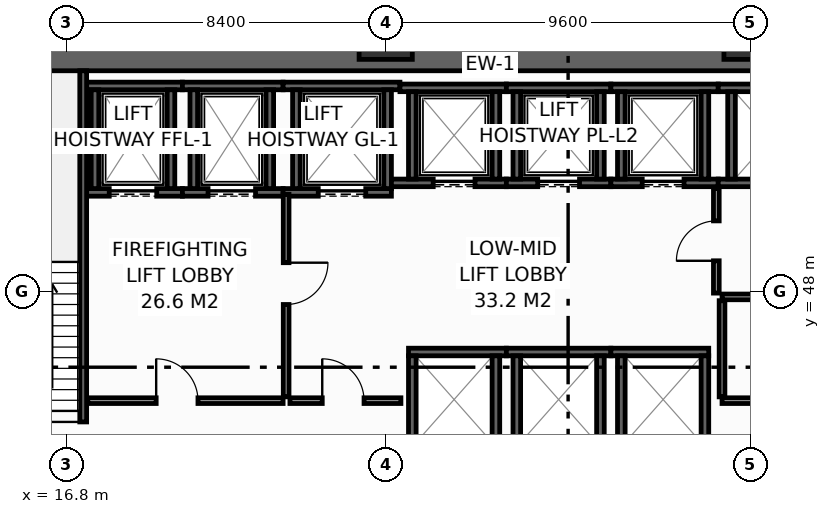
"""IFC4 building model, lengths in metres.
Left out: names, types, materials, properties, quantities, classifications, styles, units other than length and angle.
Written with IfcOpenShell. Run it as: python <this file> out.ifc"""

import sys

from ifc_helpers import new_model, si_unit, direction, frame, frame_2d, origin, origin_2d, place, context, subcontext, project, spatial, rectangle, hollow_rectangle, extrude, element, fill, save


model = new_model("IFC4")
c1 = context("Model", 3, precision=1e-05, world=origin(), true_north=direction((0.0, 1.0)))
c2 = subcontext(c1, "Body", "Model", "MODEL_VIEW")
j1 = project(units=[si_unit("LENGTHUNIT", "METRE"), si_unit("PLANEANGLEUNIT", "RADIAN")], contexts=[c1])
p1 = place(None, origin())
s1 = spatial("IfcSite", under=j1, at=p1, CompositionType="ELEMENT")
p2 = place(p1, origin())
s2 = spatial("IfcBuilding", under=s1, at=p2, CompositionType="ELEMENT")
p3 = place(p2, frame((0.0, 0.0, 11.4)))
s3 = spatial("IfcBuildingStorey", under=s2, at=p3, CompositionType="ELEMENT", Elevation=11.4)
p4 = place(p3, frame((13.5, 54.1, 0.0), z_axis=(0.0, 0.0, 1.0), x_axis=(1.0, 0.0, 0.0)))
e1 = element("IfcWall", 1, at=p4, inside=s3, PredefinedType="SHEAR", context=c2, shape_type="SweptSolid", body=[
    extrude(rectangle(XDim=32.9, YDim=0.6, at=frame_2d((16.45, 0.0))), origin(), (0.0, 0.0, 1.0), 5.1),
])
for number, where, z_axis, x_axis in (
    (2, (25.2, 54.8, 0.0), (0.0, 0.0, 1.0), (1.0, 0.0, 0.0)),
    (3, (34.8, 54.8, 0.0), (0.0, 0.0, 1.0), (1.0, 0.0, 0.0)),
):
    element("IfcColumn", number, at=place(p3, frame(where, z_axis=z_axis, x_axis=x_axis)), inside=s3, PredefinedType="COLUMN", context=c2, shape_type="SweptSolid", body=[
        extrude(hollow_rectangle(XDim=1.4, YDim=1.4, WallThickness=0.065, at=origin_2d()), origin(), (0.0, 0.0, 1.0), 5.4),
    ])
p5 = place(p3, frame((17.33, 50.6, 0.0), z_axis=(0.0, 0.0, 1.0), x_axis=(1.0, 0.0, 0.0)))
e4 = element("IfcWall", 4, at=p5, inside=s3, PredefinedType="SHEAR", context=c2, shape_type="SweptSolid", body=[
    extrude(rectangle(XDim=2.52, YDim=0.2, at=frame_2d((1.26, 0.0))), origin(), (0.0, 0.0, 1.0), 5.1),
])
p6 = place(p5, frame((0.595, 0.0, 0.0)))
e5 = element("IfcOpeningElement", 5, at=p6, cuts=e4, PredefinedType="OPENING", context=c2, shape_type="SweptSolid", body=[
    extrude(rectangle(XDim=1.25, YDim=2.3, at=frame_2d((0.625, 1.15))), frame((0.0, 0.11, 0.0), z_axis=(0.0, -1.0, 0.0), x_axis=(1.0, 0.0, 0.0)), (0.0, 0.0, 1.0), 0.22),
])
p7 = place(p3, frame((17.33, 53.4, 0.0), z_axis=(0.0, 0.0, 1.0), x_axis=(1.0, 0.0, 0.0)))
e6 = element("IfcWall", 6, at=p7, inside=s3, PredefinedType="SHEAR", context=c2, shape_type="SweptSolid", body=[
    extrude(rectangle(XDim=2.52, YDim=0.2, at=frame_2d((1.26, 0.0))), origin(), (0.0, 0.0, 1.0), 5.1),
])
for number, where, z_axis, x_axis in (
    (7, (17.55, 50.7, 0.0), (0.0, 0.0, 1.0), (0.0, 1.0, 0.0)),
    (8, (19.55, 50.7, 0.0), (0.0, 0.0, 1.0), (0.0, 1.0, 0.0)),
):
    element("IfcWall", number, at=place(p3, frame(where, z_axis=z_axis, x_axis=x_axis)), inside=s3, PredefinedType="SHEAR", context=c2, shape_type="SweptSolid", body=[
        extrude(rectangle(XDim=2.6, YDim=0.2, at=frame_2d((1.3, 0.0))), origin(), (0.0, 0.0, 1.0), 5.1),
    ])
p8 = place(p3, frame((19.85, 50.6, 0.0), z_axis=(0.0, 0.0, 1.0), x_axis=(1.0, 0.0, 0.0)))
e9 = element("IfcWall", 9, at=p8, inside=s3, PredefinedType="SHEAR", context=c2, shape_type="SweptSolid", body=[
    extrude(rectangle(XDim=2.65, YDim=0.2, at=frame_2d((1.325, 0.0))), origin(), (0.0, 0.0, 1.0), 5.1),
])
p9 = place(p8, frame((0.675, 0.0, 0.0)))
e10 = element("IfcOpeningElement", 10, at=p9, cuts=e9, PredefinedType="OPENING", context=c2, shape_type="SweptSolid", body=[
    extrude(rectangle(XDim=1.25, YDim=2.3, at=frame_2d((0.625, 1.15))), frame((0.0, 0.11, 0.0), z_axis=(0.0, -1.0, 0.0), x_axis=(1.0, 0.0, 0.0)), (0.0, 0.0, 1.0), 0.22),
])
p10 = place(p3, frame((19.85, 53.4, 0.0), z_axis=(0.0, 0.0, 1.0), x_axis=(1.0, 0.0, 0.0)))
e11 = element("IfcWall", 11, at=p10, inside=s3, PredefinedType="SHEAR", context=c2, shape_type="SweptSolid", body=[
    extrude(rectangle(XDim=2.65, YDim=0.2, at=frame_2d((1.325, 0.0))), origin(), (0.0, 0.0, 1.0), 5.1),
])
for number, where, z_axis, x_axis in (
    (12, (20.15, 50.7, 0.0), (0.0, 0.0, 1.0), (0.0, 1.0, 0.0)),
    (13, (22.15, 50.7, 0.0), (0.0, 0.0, 1.0), (0.0, 1.0, 0.0)),
):
    element("IfcWall", number, at=place(p3, frame(where, z_axis=z_axis, x_axis=x_axis)), inside=s3, PredefinedType="SHEAR", context=c2, shape_type="SweptSolid", body=[
        extrude(rectangle(XDim=2.6, YDim=0.2, at=frame_2d((1.3, 0.0))), origin(), (0.0, 0.0, 1.0), 5.1),
    ])
p11 = place(p3, frame((22.5, 50.6, 0.0), z_axis=(0.0, 0.0, 1.0), x_axis=(1.0, 0.0, 0.0)))
e14 = element("IfcWall", 14, at=p11, inside=s3, PredefinedType="SHEAR", context=c2, shape_type="SweptSolid", body=[
    extrude(rectangle(XDim=2.85, YDim=0.2, at=frame_2d((1.425, 0.0))), origin(), (0.0, 0.0, 1.0), 5.1),
])
p12 = place(p11, frame((0.925, 0.0, 0.0)))
e15 = element("IfcOpeningElement", 15, at=p12, cuts=e14, PredefinedType="OPENING", context=c2, shape_type="SweptSolid", body=[
    extrude(rectangle(XDim=1.25, YDim=2.3, at=frame_2d((0.625, 1.15))), frame((0.0, 0.11, 0.0), z_axis=(0.0, -1.0, 0.0), x_axis=(1.0, 0.0, 0.0)), (0.0, 0.0, 1.0), 0.22),
])
p13 = place(p3, frame((22.5, 53.4, 0.0), z_axis=(0.0, 0.0, 1.0), x_axis=(1.0, 0.0, 0.0)))
e16 = element("IfcWall", 16, at=p13, inside=s3, PredefinedType="SHEAR", context=c2, shape_type="SweptSolid", body=[
    extrude(rectangle(XDim=3.075, YDim=0.2, at=frame_2d((1.538, 0.0))), origin(), (0.0, 0.0, 1.0), 5.1),
])
for number, where, z_axis, x_axis in (
    (17, (22.85, 50.7, 0.0), (0.0, 0.0, 1.0), (0.0, 1.0, 0.0)),
    (18, (25.25, 50.7, 0.0), (0.0, 0.0, 1.0), (0.0, 1.0, 0.0)),
):
    element("IfcWall", number, at=place(p3, frame(where, z_axis=z_axis, x_axis=x_axis)), inside=s3, PredefinedType="SHEAR", context=c2, shape_type="SweptSolid", body=[
        extrude(rectangle(XDim=2.6, YDim=0.2, at=frame_2d((1.3, 0.0))), origin(), (0.0, 0.0, 1.0), 5.1),
    ])
p14 = place(p3, frame((25.35, 50.85, 0.0), z_axis=(0.0, 0.0, 1.0), x_axis=(1.0, 0.0, 0.0)))
e19 = element("IfcWall", 19, at=p14, inside=s3, PredefinedType="SHEAR", context=c2, shape_type="SweptSolid", body=[
    extrude(rectangle(XDim=3.025, YDim=0.2, at=frame_2d((1.512, 0.0))), origin(), (0.0, 0.0, 1.0), 5.1),
])
p15 = place(p14, frame((1.1, 0.0, 0.0)))
e20 = element("IfcOpeningElement", 20, at=p15, cuts=e19, PredefinedType="OPENING", context=c2, shape_type="SweptSolid", body=[
    extrude(rectangle(XDim=1.1, YDim=2.2, at=frame_2d((0.55, 1.1))), frame((0.0, 0.11, 0.0), z_axis=(0.0, -1.0, 0.0), x_axis=(1.0, 0.0, 0.0)), (0.0, 0.0, 1.0), 0.22),
])
p16 = place(p3, frame((25.575, 53.35, 0.0), z_axis=(0.0, 0.0, 1.0), x_axis=(1.0, 0.0, 0.0)))
e21 = element("IfcWall", 21, at=p16, inside=s3, PredefinedType="SHEAR", context=c2, shape_type="SweptSolid", body=[
    extrude(rectangle(XDim=2.8, YDim=0.2, at=frame_2d((1.4, 0.0))), origin(), (0.0, 0.0, 1.0), 5.1),
])
for number, where, z_axis, x_axis in (
    (22, (25.9, 50.95, 0.0), (0.0, 0.0, 1.0), (0.0, 1.0, 0.0)),
    (23, (28.1, 50.95, 0.0), (0.0, 0.0, 1.0), (0.0, 1.0, 0.0)),
):
    element("IfcWall", number, at=place(p3, frame(where, z_axis=z_axis, x_axis=x_axis)), inside=s3, PredefinedType="SHEAR", context=c2, shape_type="SweptSolid", body=[
        extrude(rectangle(XDim=2.3, YDim=0.2, at=frame_2d((1.15, 0.0))), origin(), (0.0, 0.0, 1.0), 5.1),
    ])
p17 = place(p3, frame((28.375, 50.85, 0.0), z_axis=(0.0, 0.0, 1.0), x_axis=(1.0, 0.0, 0.0)))
e24 = element("IfcWall", 24, at=p17, inside=s3, PredefinedType="SHEAR", context=c2, shape_type="SweptSolid", body=[
    extrude(rectangle(XDim=2.75, YDim=0.2, at=frame_2d((1.375, 0.0))), origin(), (0.0, 0.0, 1.0), 5.1),
])
p18 = place(p17, frame((0.825, 0.0, 0.0)))
e25 = element("IfcOpeningElement", 25, at=p18, cuts=e24, PredefinedType="OPENING", context=c2, shape_type="SweptSolid", body=[
    extrude(rectangle(XDim=1.1, YDim=2.2, at=frame_2d((0.55, 1.1))), frame((0.0, 0.11, 0.0), z_axis=(0.0, -1.0, 0.0), x_axis=(1.0, 0.0, 0.0)), (0.0, 0.0, 1.0), 0.22),
])
p19 = place(p3, frame((28.375, 53.35, 0.0), z_axis=(0.0, 0.0, 1.0), x_axis=(1.0, 0.0, 0.0)))
e26 = element("IfcWall", 26, at=p19, inside=s3, PredefinedType="SHEAR", context=c2, shape_type="SweptSolid", body=[
    extrude(rectangle(XDim=2.75, YDim=0.2, at=frame_2d((1.375, 0.0))), origin(), (0.0, 0.0, 1.0), 5.1),
])
for number, where, z_axis, x_axis in (
    (27, (28.65, 50.95, 0.0), (0.0, 0.0, 1.0), (0.0, 1.0, 0.0)),
    (28, (30.85, 50.95, 0.0), (0.0, 0.0, 1.0), (0.0, 1.0, 0.0)),
):
    element("IfcWall", number, at=place(p3, frame(where, z_axis=z_axis, x_axis=x_axis)), inside=s3, PredefinedType="SHEAR", context=c2, shape_type="SweptSolid", body=[
        extrude(rectangle(XDim=2.3, YDim=0.2, at=frame_2d((1.15, 0.0))), origin(), (0.0, 0.0, 1.0), 5.1),
    ])
p20 = place(p3, frame((31.125, 50.85, 0.0), z_axis=(0.0, 0.0, 1.0), x_axis=(1.0, 0.0, 0.0)))
e29 = element("IfcWall", 29, at=p20, inside=s3, PredefinedType="SHEAR", context=c2, shape_type="SweptSolid", body=[
    extrude(rectangle(XDim=2.825, YDim=0.2, at=frame_2d((1.413, 0.0))), origin(), (0.0, 0.0, 1.0), 5.1),
])
p21 = place(p20, frame((0.825, 0.0, 0.0)))
e30 = element("IfcOpeningElement", 30, at=p21, cuts=e29, PredefinedType="OPENING", context=c2, shape_type="SweptSolid", body=[
    extrude(rectangle(XDim=1.1, YDim=2.2, at=frame_2d((0.55, 1.1))), frame((0.0, 0.11, 0.0), z_axis=(0.0, -1.0, 0.0), x_axis=(1.0, 0.0, 0.0)), (0.0, 0.0, 1.0), 0.22),
])
p22 = place(p3, frame((31.125, 53.35, 0.0), z_axis=(0.0, 0.0, 1.0), x_axis=(1.0, 0.0, 0.0)))
e31 = element("IfcWall", 31, at=p22, inside=s3, PredefinedType="SHEAR", context=c2, shape_type="SweptSolid", body=[
    extrude(rectangle(XDim=2.825, YDim=0.2, at=frame_2d((1.413, 0.0))), origin(), (0.0, 0.0, 1.0), 5.1),
])
for number, where, z_axis, x_axis in (
    (32, (31.4, 50.95, 0.0), (0.0, 0.0, 1.0), (0.0, 1.0, 0.0)),
    (33, (33.6, 50.95, 0.0), (0.0, 0.0, 1.0), (0.0, 1.0, 0.0)),
):
    element("IfcWall", number, at=place(p3, frame(where, z_axis=z_axis, x_axis=x_axis)), inside=s3, PredefinedType="SHEAR", context=c2, shape_type="SweptSolid", body=[
        extrude(rectangle(XDim=2.3, YDim=0.2, at=frame_2d((1.15, 0.0))), origin(), (0.0, 0.0, 1.0), 5.1),
    ])
p23 = place(p3, frame((25.8, 46.4, 0.0), z_axis=(0.0, 0.0, 1.0), x_axis=(1.0, 0.0, 0.0)))
e34 = element("IfcWall", 34, at=p23, inside=s3, PredefinedType="SHEAR", context=c2, shape_type="SweptSolid", body=[
    extrude(rectangle(XDim=2.575, YDim=0.2, at=frame_2d((1.288, 0.0))), origin(), (0.0, 0.0, 1.0), 5.1),
])
for number, where, z_axis, x_axis in (
    (35, (25.9, 44.0, 0.0), (0.0, 0.0, 1.0), (0.0, 1.0, 0.0)),
    (36, (28.1, 44.0, 0.0), (0.0, 0.0, 1.0), (0.0, 1.0, 0.0)),
):
    element("IfcWall", number, at=place(p3, frame(where, z_axis=z_axis, x_axis=x_axis)), inside=s3, PredefinedType="SHEAR", context=c2, shape_type="SweptSolid", body=[
        extrude(rectangle(XDim=2.3, YDim=0.2, at=frame_2d((1.15, 0.0))), origin(), (0.0, 0.0, 1.0), 5.1),
    ])
p24 = place(p3, frame((28.375, 46.4, 0.0), z_axis=(0.0, 0.0, 1.0), x_axis=(1.0, 0.0, 0.0)))
e37 = element("IfcWall", 37, at=p24, inside=s3, PredefinedType="SHEAR", context=c2, shape_type="SweptSolid", body=[
    extrude(rectangle(XDim=2.75, YDim=0.2, at=frame_2d((1.375, 0.0))), origin(), (0.0, 0.0, 1.0), 5.1),
])
for number, where, z_axis, x_axis in (
    (38, (28.65, 44.0, 0.0), (0.0, 0.0, 1.0), (0.0, 1.0, 0.0)),
    (39, (30.85, 44.0, 0.0), (0.0, 0.0, 1.0), (0.0, 1.0, 0.0)),
):
    element("IfcWall", number, at=place(p3, frame(where, z_axis=z_axis, x_axis=x_axis)), inside=s3, PredefinedType="SHEAR", context=c2, shape_type="SweptSolid", body=[
        extrude(rectangle(XDim=2.3, YDim=0.2, at=frame_2d((1.15, 0.0))), origin(), (0.0, 0.0, 1.0), 5.1),
    ])
p25 = place(p3, frame((31.125, 46.4, 0.0), z_axis=(0.0, 0.0, 1.0), x_axis=(1.0, 0.0, 0.0)))
e40 = element("IfcWall", 40, at=p25, inside=s3, PredefinedType="SHEAR", context=c2, shape_type="SweptSolid", body=[
    extrude(rectangle(XDim=2.575, YDim=0.2, at=frame_2d((1.288, 0.0))), origin(), (0.0, 0.0, 1.0), 5.1),
])
for number, where, z_axis, x_axis in (
    (41, (31.4, 44.0, 0.0), (0.0, 0.0, 1.0), (0.0, 1.0, 0.0)),
    (42, (33.6, 44.0, 0.0), (0.0, 0.0, 1.0), (0.0, 1.0, 0.0)),
):
    element("IfcWall", number, at=place(p3, frame(where, z_axis=z_axis, x_axis=x_axis)), inside=s3, PredefinedType="SHEAR", context=c2, shape_type="SweptSolid", body=[
        extrude(rectangle(XDim=2.3, YDim=0.2, at=frame_2d((1.15, 0.0))), origin(), (0.0, 0.0, 1.0), 5.1),
    ])
for number, where, z_axis, x_axis in (
    (43, (33.95, 50.85, 0.0), (0.0, 0.0, 1.0), (1.0, 0.0, 0.0)),
    (44, (33.95, 53.35, 0.0), (0.0, 0.0, 1.0), (1.0, 0.0, 0.0)),
):
    element("IfcWall", number, at=place(p3, frame(where, z_axis=z_axis, x_axis=x_axis)), inside=s3, PredefinedType="SHEAR", context=c2, shape_type="SweptSolid", body=[
        extrude(rectangle(XDim=2.825, YDim=0.2, at=frame_2d((1.413, 0.0))), origin(), (0.0, 0.0, 1.0), 5.1),
    ])
p26 = place(p3, frame((34.3, 50.95, 0.0), z_axis=(0.0, 0.0, 1.0), x_axis=(0.0, 1.0, 0.0)))
e45 = element("IfcWall", 45, at=p26, inside=s3, PredefinedType="SHEAR", context=c2, shape_type="SweptSolid", body=[
    extrude(rectangle(XDim=2.3, YDim=0.2, at=frame_2d((1.15, 0.0))), origin(), (0.0, 0.0, 1.0), 5.1),
])
p27 = place(p3, frame((17.24, 43.4, 0.0), z_axis=(0.0, 0.0, 1.0), x_axis=(0.0, 1.0, 0.0)))
e46 = element("IfcWall", 46, at=p27, inside=s3, PredefinedType="SHEAR", context=c2, shape_type="SweptSolid", body=[
    extrude(rectangle(XDim=10.4, YDim=0.18, at=frame_2d((5.2, 0.0))), origin(), (0.0, 0.0, 1.0), 5.1),
])
p28 = place(p27, frame((0.16, 0.0, 0.0)))
e47 = element("IfcOpeningElement", 47, at=p28, cuts=e46, PredefinedType="OPENING", context=c2, shape_type="SweptSolid", body=[
    extrude(rectangle(XDim=1.0, YDim=2.15, at=frame_2d((0.5, 1.075))), frame((0.0, 0.1, 0.0), z_axis=(0.0, -1.0, 0.0), x_axis=(1.0, 0.0, 0.0)), (0.0, 0.0, 1.0), 0.2),
])
p29 = place(p3, frame((17.36, 45.12, 0.0), z_axis=(0.0, 0.0, 1.0), x_axis=(1.0, 0.0, 0.0)))
e48 = element("IfcWall", 48, at=p29, inside=s3, PredefinedType="PARTITIONING", context=c2, shape_type="SweptSolid", body=[
    extrude(rectangle(XDim=5.14, YDim=0.15, at=frame_2d((2.57, 0.0))), origin(), (0.0, 0.0, 1.0), 5.1),
])
p30 = place(p29, frame((1.8, 0.0, 0.0)))
e49 = element("IfcOpeningElement", 49, at=p30, cuts=e48, PredefinedType="OPENING", context=c2, shape_type="SweptSolid", body=[
    extrude(rectangle(XDim=1.1, YDim=2.15, at=frame_2d((0.55, 1.075))), frame((0.0, 0.085, 0.0), z_axis=(0.0, -1.0, 0.0), x_axis=(1.0, 0.0, 0.0)), (0.0, 0.0, 1.0), 0.17),
])
p31 = place(p3, frame((22.58, 50.55, 0.0), z_axis=(0.0, 0.0, 1.0), x_axis=(0.0, -1.0, 0.0)))
e50 = element("IfcWall", 50, at=p31, inside=s3, PredefinedType="PARTITIONING", context=c2, shape_type="SweptSolid", body=[
    extrude(rectangle(XDim=5.33, YDim=0.15, at=frame_2d((2.665, 0.0))), origin(), (0.0, 0.0, 1.0), 5.1),
])
p32 = place(p31, frame((1.8, 0.0, 0.0)))
e51 = element("IfcOpeningElement", 51, at=p32, cuts=e50, PredefinedType="OPENING", context=c2, shape_type="SweptSolid", body=[
    extrude(rectangle(XDim=1.1, YDim=2.15, at=frame_2d((0.55, 1.075))), frame((0.0, 0.085, 0.0), z_axis=(0.0, -1.0, 0.0), x_axis=(1.0, 0.0, 0.0)), (0.0, 0.0, 1.0), 0.17),
])
p33 = place(p3, frame((22.68, 45.12, 0.0), z_axis=(0.0, 0.0, 1.0), x_axis=(1.0, 0.0, 0.0)))
e52 = element("IfcWall", 52, at=p33, inside=s3, PredefinedType="PARTITIONING", context=c2, shape_type="SweptSolid", body=[
    extrude(rectangle(XDim=2.92, YDim=0.15, at=frame_2d((1.46, 0.0))), origin(), (0.0, 0.0, 1.0), 5.1),
])
p34 = place(p33, frame((0.85, 0.0, 0.0)))
e53 = element("IfcOpeningElement", 53, at=p34, cuts=e52, PredefinedType="OPENING", context=c2, shape_type="SweptSolid", body=[
    extrude(rectangle(XDim=1.1, YDim=2.15, at=frame_2d((0.55, 1.075))), frame((0.0, 0.085, 0.0), z_axis=(0.0, -1.0, 0.0), x_axis=(1.0, 0.0, 0.0)), (0.0, 0.0, 1.0), 0.17),
])
p35 = place(p3, frame((33.9, 47.95, 0.0), z_axis=(0.0, 0.0, 1.0), x_axis=(0.0, 1.0, 0.0)))
e54 = element("IfcWall", 54, at=p35, inside=s3, PredefinedType="PARTITIONING", context=c2, shape_type="SweptSolid", body=[
    extrude(rectangle(XDim=2.75, YDim=0.15, at=frame_2d((1.375, 0.0))), origin(), (0.0, 0.0, 1.0), 5.1),
])
p36 = place(p35, frame((0.85, 0.0, 0.0)))
e55 = element("IfcOpeningElement", 55, at=p36, cuts=e54, PredefinedType="OPENING", context=c2, shape_type="SweptSolid", body=[
    extrude(rectangle(XDim=1.05, YDim=2.15, at=frame_2d((0.525, 1.075))), frame((0.0, 0.085, 0.0), z_axis=(0.0, -1.0, 0.0), x_axis=(1.0, 0.0, 0.0)), (0.0, 0.0, 1.0), 0.17),
])
p37 = place(p3, frame((34.05, 45.12, 0.0), z_axis=(0.0, 0.0, 1.0), x_axis=(1.0, 0.0, 0.0)))
e56 = element("IfcWall", 56, at=p37, inside=s3, PredefinedType="PARTITIONING", context=c2, shape_type="SweptSolid", body=[
    extrude(rectangle(XDim=8.45, YDim=0.15, at=frame_2d((4.225, 0.0))), origin(), (0.0, 0.0, 1.0), 5.1),
])
p38 = place(p37, frame((1.5, 0.0, 0.0)))
e57 = element("IfcOpeningElement", 57, at=p38, cuts=e56, PredefinedType="OPENING", context=c2, shape_type="SweptSolid", body=[
    extrude(rectangle(XDim=0.95, YDim=2.15, at=frame_2d((0.475, 1.075))), frame((0.0, 0.085, 0.0), z_axis=(0.0, -1.0, 0.0), x_axis=(1.0, 0.0, 0.0)), (0.0, 0.0, 1.0), 0.17),
])
p39 = place(p37, frame((5.8, 0.0, 0.0)))
e58 = element("IfcOpeningElement", 58, at=p39, cuts=e56, PredefinedType="OPENING", context=c2, shape_type="SweptSolid", body=[
    extrude(rectangle(XDim=0.95, YDim=2.15, at=frame_2d((0.475, 1.075))), frame((0.0, 0.085, 0.0), z_axis=(0.0, -1.0, 0.0), x_axis=(1.0, 0.0, 0.0)), (0.0, 0.0, 1.0), 0.17),
])
p40 = place(p3, frame((34.05, 47.85, 0.0), z_axis=(0.0, 0.0, 1.0), x_axis=(1.0, 0.0, 0.0)))
e59 = element("IfcWall", 59, at=p40, inside=s3, PredefinedType="PARTITIONING", context=c2, shape_type="SweptSolid", body=[
    extrude(rectangle(XDim=8.45, YDim=0.15, at=frame_2d((4.225, 0.0))), origin(), (0.0, 0.0, 1.0), 5.1),
])
p41 = place(p3, frame((34.05, 45.22, 0.0), z_axis=(0.0, 0.0, 1.0), x_axis=(0.0, 1.0, 0.0)))
e60 = element("IfcWall", 60, at=p41, inside=s3, PredefinedType="PARTITIONING", context=c2, shape_type="SweptSolid", body=[
    extrude(rectangle(XDim=2.53, YDim=0.15, at=frame_2d((1.265, 0.0))), origin(), (0.0, 0.0, 1.0), 5.1),
])
p42 = place(p6, origin())
e61 = element("IfcDoor", 61, at=p42, inside=s3, OperationType="SLIDING_TO_LEFT", PredefinedType="DOOR", context=c2, shape_type="SweptSolid", body=[
    extrude(rectangle(XDim=1.25, YDim=2.3, at=frame_2d((0.625, 1.15))), frame((0.0, 0.025, 0.0), z_axis=(0.0, -1.0, 0.0), x_axis=(1.0, 0.0, 0.0)), (0.0, 0.0, 1.0), 0.05),
])
fill(e5, e61)
p43 = place(p9, origin())
e62 = element("IfcDoor", 62, at=p43, inside=s3, OperationType="SLIDING_TO_LEFT", PredefinedType="DOOR", context=c2, shape_type="SweptSolid", body=[
    extrude(rectangle(XDim=1.25, YDim=2.3, at=frame_2d((0.625, 1.15))), frame((0.0, 0.025, 0.0), z_axis=(0.0, -1.0, 0.0), x_axis=(1.0, 0.0, 0.0)), (0.0, 0.0, 1.0), 0.05),
])
fill(e10, e62)
p44 = place(p12, origin())
e63 = element("IfcDoor", 63, at=p44, inside=s3, OperationType="SLIDING_TO_LEFT", PredefinedType="DOOR", context=c2, shape_type="SweptSolid", body=[
    extrude(rectangle(XDim=1.25, YDim=2.3, at=frame_2d((0.625, 1.15))), frame((0.0, 0.025, 0.0), z_axis=(0.0, -1.0, 0.0), x_axis=(1.0, 0.0, 0.0)), (0.0, 0.0, 1.0), 0.05),
])
fill(e15, e63)
p45 = place(p15, origin())
e64 = element("IfcDoor", 64, at=p45, inside=s3, OperationType="SLIDING_TO_LEFT", PredefinedType="DOOR", context=c2, shape_type="SweptSolid", body=[
    extrude(rectangle(XDim=1.1, YDim=2.2, at=frame_2d((0.55, 1.1))), frame((0.0, 0.025, 0.0), z_axis=(0.0, -1.0, 0.0), x_axis=(1.0, 0.0, 0.0)), (0.0, 0.0, 1.0), 0.05),
])
fill(e20, e64)
p46 = place(p18, origin())
e65 = element("IfcDoor", 65, at=p46, inside=s3, OperationType="SLIDING_TO_LEFT", PredefinedType="DOOR", context=c2, shape_type="SweptSolid", body=[
    extrude(rectangle(XDim=1.1, YDim=2.2, at=frame_2d((0.55, 1.1))), frame((0.0, 0.025, 0.0), z_axis=(0.0, -1.0, 0.0), x_axis=(1.0, 0.0, 0.0)), (0.0, 0.0, 1.0), 0.05),
])
fill(e25, e65)
p47 = place(p21, origin())
e66 = element("IfcDoor", 66, at=p47, inside=s3, OperationType="SLIDING_TO_LEFT", PredefinedType="DOOR", context=c2, shape_type="SweptSolid", body=[
    extrude(rectangle(XDim=1.1, YDim=2.2, at=frame_2d((0.55, 1.1))), frame((0.0, 0.025, 0.0), z_axis=(0.0, -1.0, 0.0), x_axis=(1.0, 0.0, 0.0)), (0.0, 0.0, 1.0), 0.05),
])
fill(e30, e66)
p48 = place(p28, origin())
e67 = element("IfcDoor", 67, at=p48, inside=s3, OperationType="SINGLE_SWING_RIGHT", PredefinedType="DOOR", context=c2, shape_type="SweptSolid", body=[
    extrude(rectangle(XDim=1.0, YDim=2.15, at=frame_2d((0.5, 1.075))), frame((0.0, 0.025, 0.0), z_axis=(0.0, -1.0, 0.0), x_axis=(1.0, 0.0, 0.0)), (0.0, 0.0, 1.0), 0.05),
])
fill(e47, e67)
p49 = place(p30, origin())
e68 = element("IfcDoor", 68, at=p49, inside=s3, OperationType="SINGLE_SWING_LEFT", PredefinedType="DOOR", context=c2, shape_type="SweptSolid", body=[
    extrude(rectangle(XDim=1.1, YDim=2.15, at=frame_2d((0.55, 1.075))), frame((0.0, 0.025, 0.0), z_axis=(0.0, -1.0, 0.0), x_axis=(1.0, 0.0, 0.0)), (0.0, 0.0, 1.0), 0.05),
])
fill(e49, e68)
p50 = place(p32, origin())
e69 = element("IfcDoor", 69, at=p50, inside=s3, OperationType="SINGLE_SWING_LEFT", PredefinedType="DOOR", context=c2, shape_type="SweptSolid", body=[
    extrude(rectangle(XDim=1.1, YDim=2.15, at=frame_2d((0.55, 1.075))), frame((0.0, 0.025, 0.0), z_axis=(0.0, -1.0, 0.0), x_axis=(1.0, 0.0, 0.0)), (0.0, 0.0, 1.0), 0.05),
])
fill(e51, e69)
p51 = place(p34, origin())
e70 = element("IfcDoor", 70, at=p51, inside=s3, OperationType="SINGLE_SWING_LEFT", PredefinedType="DOOR", context=c2, shape_type="SweptSolid", body=[
    extrude(rectangle(XDim=1.1, YDim=2.15, at=frame_2d((0.55, 1.075))), frame((0.0, 0.025, 0.0), z_axis=(0.0, -1.0, 0.0), x_axis=(1.0, 0.0, 0.0)), (0.0, 0.0, 1.0), 0.05),
])
fill(e53, e70)
p52 = place(p36, origin())
e71 = element("IfcDoor", 71, at=p52, inside=s3, OperationType="SINGLE_SWING_LEFT", PredefinedType="DOOR", context=c2, shape_type="SweptSolid", body=[
    extrude(rectangle(XDim=1.05, YDim=2.15, at=frame_2d((0.525, 1.075))), frame((0.0, 0.025, 0.0), z_axis=(0.0, -1.0, 0.0), x_axis=(1.0, 0.0, 0.0)), (0.0, 0.0, 1.0), 0.05),
])
fill(e55, e71)
save(model, sys.argv[1])
